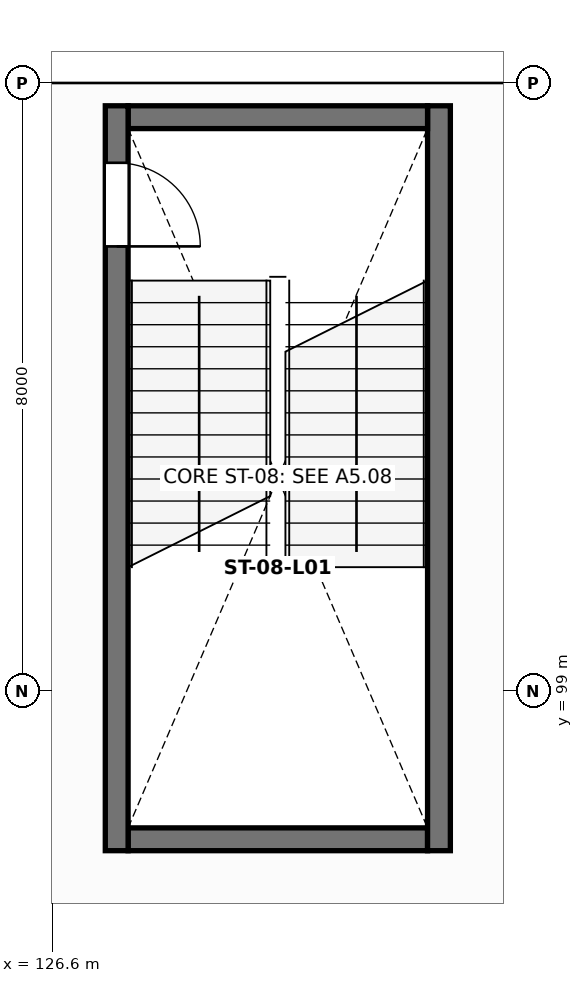
"""IFC4 building model, lengths in metres.
Left out: names, types, materials, properties, quantities, classifications, styles, units other than length and angle.
Written with IfcOpenShell. Run it as: python <this file> out.ifc"""

import sys

from ifc_helpers import new_model, si_unit, direction, frame, frame_2d, origin, place, context, subcontext, project, spatial, rectangle, extrude, element, fill, save


model = new_model("IFC4")
c1 = context("Model", 3, precision=1e-05, world=origin(), true_north=direction((0.0, 1.0)))
c2 = subcontext(c1, "Body", "Model", "MODEL_VIEW")
j1 = project(units=[si_unit("LENGTHUNIT", "METRE"), si_unit("PLANEANGLEUNIT", "RADIAN")], contexts=[c1])
p1 = place(None, origin())
s1 = spatial("IfcSite", under=j1, at=p1, CompositionType="ELEMENT")
p2 = place(p1, origin())
s2 = spatial("IfcBuilding", under=s1, at=p2, CompositionType="ELEMENT")
p3 = place(p2, frame((0.0, 0.0, 6.0)))
s3 = spatial("IfcBuildingStorey", under=s2, at=p3, CompositionType="ELEMENT", Elevation=6.0)
p4 = place(p3, frame((127.6, 97.05, 0.0), z_axis=(0.0, 0.0, 1.0), x_axis=(1.0, 0.0, 0.0)))
e1 = element("IfcWall", 1, at=p4, inside=s3, PredefinedType="SHEAR", context=c2, shape_type="SweptSolid", body=[
    extrude(rectangle(XDim=3.94, YDim=0.3, at=frame_2d((1.97, 0.0))), origin(), (0.0, 0.0, 1.0), 4.945),
])
p5 = place(p3, frame((131.69, 96.9, 0.0), z_axis=(0.0, 0.0, 1.0), x_axis=(0.0, 1.0, 0.0)))
e2 = element("IfcWall", 2, at=p5, inside=s3, PredefinedType="SHEAR", context=c2, shape_type="SweptSolid", body=[
    extrude(rectangle(XDim=9.8, YDim=0.3, at=frame_2d((4.9, 0.0))), origin(), (0.0, 0.0, 1.0), 4.945),
])
p6 = place(p3, frame((131.54, 106.55, 0.0), z_axis=(0.0, 0.0, 1.0), x_axis=(-1.0, 0.0, 0.0)))
e3 = element("IfcWall", 3, at=p6, inside=s3, PredefinedType="SHEAR", context=c2, shape_type="SweptSolid", body=[
    extrude(rectangle(XDim=3.94, YDim=0.3, at=frame_2d((1.97, 0.0))), origin(), (0.0, 0.0, 1.0), 4.945),
])
p7 = place(p3, frame((127.45, 106.7, 0.0), z_axis=(0.0, 0.0, 1.0), x_axis=(0.0, -1.0, 0.0)))
e4 = element("IfcWall", 4, at=p7, inside=s3, PredefinedType="SHEAR", context=c2, shape_type="SweptSolid", body=[
    extrude(rectangle(XDim=9.8, YDim=0.3, at=frame_2d((4.9, 0.0))), origin(), (0.0, 0.0, 1.0), 4.945),
])
p8 = place(p7, frame((0.75, 0.0, 0.0)))
e5 = element("IfcOpeningElement", 5, at=p8, cuts=e4, PredefinedType="OPENING", context=c2, shape_type="SweptSolid", body=[
    extrude(rectangle(XDim=1.1, YDim=2.15, at=frame_2d((0.55, 1.075))), frame((0.0, 0.16, 0.0), z_axis=(0.0, -1.0, 0.0), x_axis=(1.0, 0.0, 0.0)), (0.0, 0.0, 1.0), 0.32),
])
p9 = place(p8, origin())
e6 = element("IfcDoor", 6, at=p9, inside=s3, OperationType="SINGLE_SWING_RIGHT", PredefinedType="DOOR", context=c2, shape_type="SweptSolid", body=[
    extrude(rectangle(XDim=1.1, YDim=2.15, at=frame_2d((0.55, 1.075))), frame((0.0, 0.025, 0.0), z_axis=(0.0, -1.0, 0.0), x_axis=(1.0, 0.0, 0.0)), (0.0, 0.0, 1.0), 0.05),
])
fill(e5, e6)
save(model, sys.argv[1])
